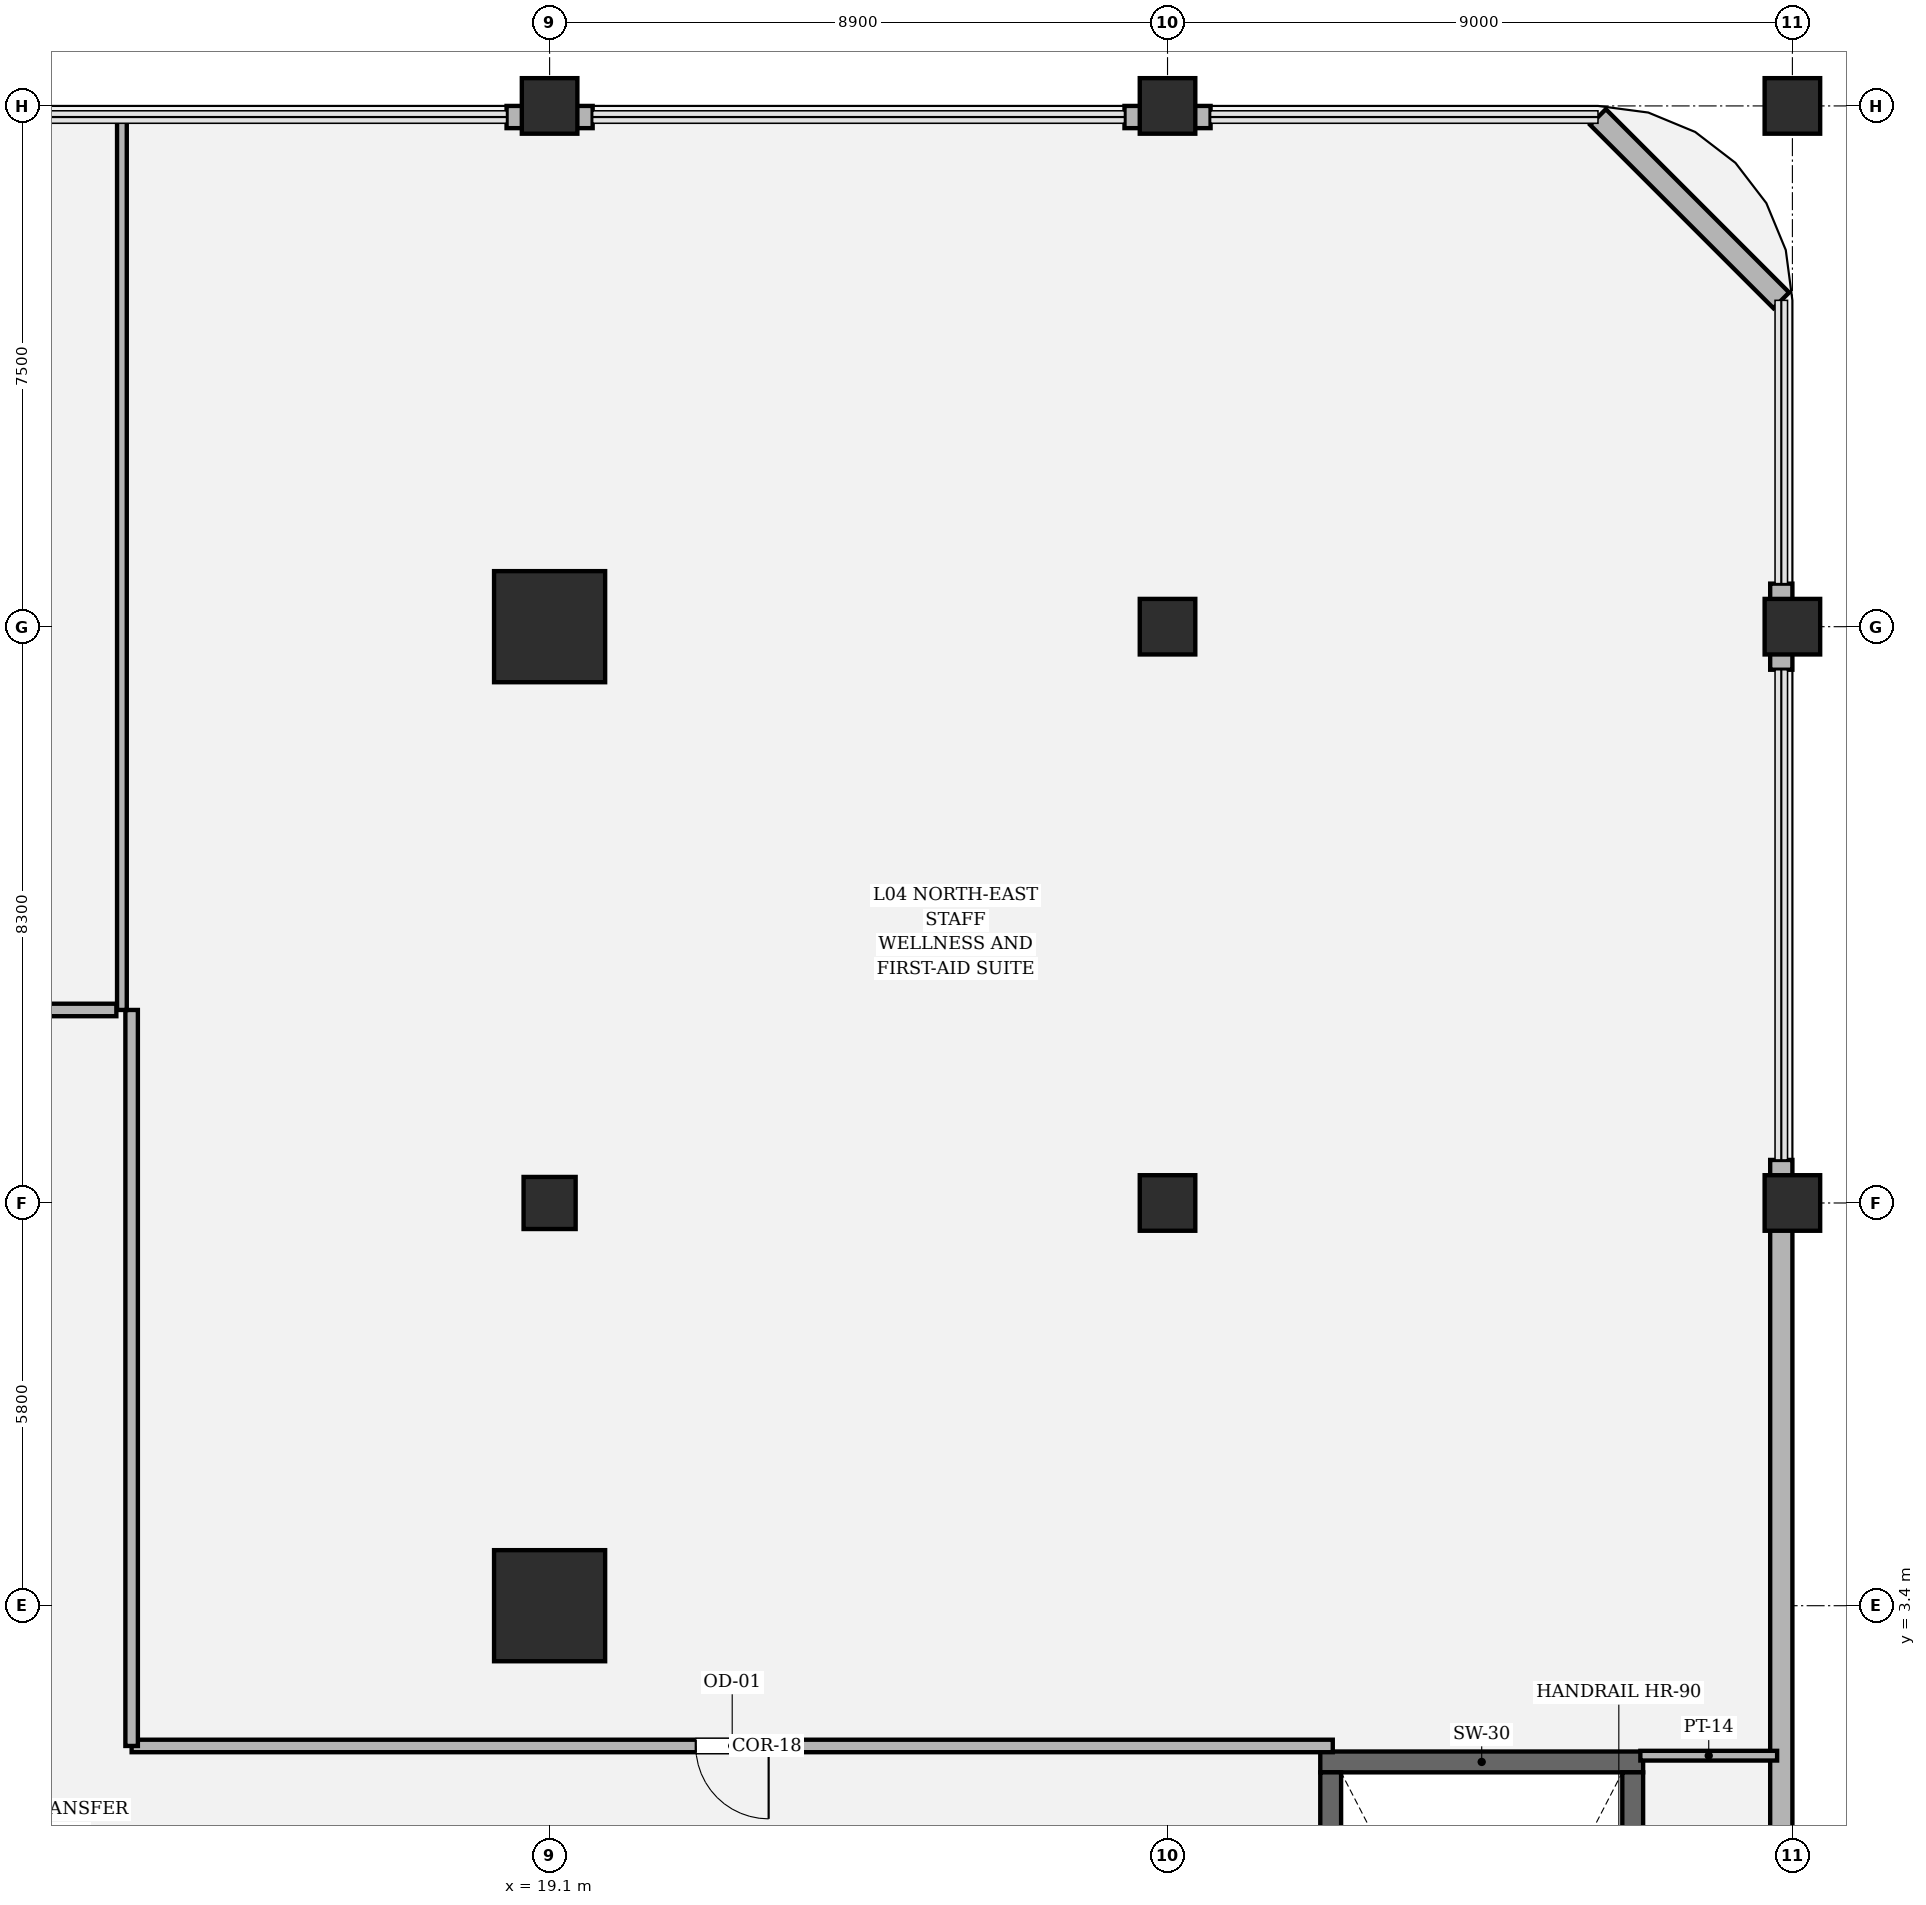
"""IFC4 building model, lengths in metres.
Left out: names, types, materials, properties, quantities, classifications, styles, units other than length and angle.
Written with IfcOpenShell. Run it as: python <this file> out.ifc"""

import sys

from ifc_helpers import new_model, si_unit, direction, frame, frame_2d, origin, origin_2d, place, context, subcontext, project, spatial, rectangle, hollow_rectangle, circle, extrude, element, fill, save


model = new_model("IFC4")
c1 = context("Model", 3, precision=1e-05, world=origin(), true_north=direction((0.0, 1.0)))
c2 = subcontext(c1, "Body", "Model", "MODEL_VIEW")
j1 = project(units=[si_unit("LENGTHUNIT", "METRE"), si_unit("PLANEANGLEUNIT", "RADIAN")], contexts=[c1])
p1 = place(None, origin())
s1 = spatial("IfcSite", under=j1, at=p1, CompositionType="ELEMENT")
p2 = place(p1, origin())
s2 = spatial("IfcBuilding", under=s1, at=p2, CompositionType="ELEMENT")
p3 = place(p2, frame((0.0, 0.0, 22.2)))
s3 = spatial("IfcBuildingStorey", under=s2, at=p3, CompositionType="ELEMENT", Elevation=22.2)
p4 = place(p3, frame((34.85, 1.15, 0.0), z_axis=(0.0, 0.0, 1.0), x_axis=(-1.0, 0.0, 0.0)))
e1 = element("IfcWall", 1, at=p4, inside=s3, PredefinedType="SOLIDWALL", context=c2, shape_type="SweptSolid", body=[
    extrude(rectangle(XDim=4.65, YDim=0.3, at=frame_2d((2.325, 0.0))), origin(), (0.0, 0.0, 1.0), 6.0),
])
for number, where, z_axis, x_axis in (
    (2, (30.35, -8.8, 0.0), (0.0, 0.0, 1.0), (0.0, 1.0, 0.0)),
    (3, (34.7, 1.0, 0.0), (0.0, 0.0, 1.0), (0.0, -1.0, 0.0)),
):
    element("IfcWall", number, at=place(p3, frame(where, z_axis=z_axis, x_axis=x_axis)), inside=s3, PredefinedType="SOLIDWALL", context=c2, shape_type="SweptSolid", body=[
        extrude(rectangle(XDim=9.8, YDim=0.3, at=frame_2d((4.9, 0.0))), origin(), (0.0, 0.0, 1.0), 6.0),
    ])
for number, where, z_axis, x_axis in (
    (4, (19.1, 3.4, 0.0), (0.0, 0.0, 1.0), (1.0, 0.0, 0.0)),
    (5, (19.1, 17.5, 0.0), (0.0, 0.0, 1.0), (1.0, 0.0, 0.0)),
):
    element("IfcColumn", number, at=place(p3, frame(where, z_axis=z_axis, x_axis=x_axis)), inside=s3, PredefinedType="COLUMN", context=c2, shape_type="SweptSolid", body=[
        extrude(hollow_rectangle(XDim=1.6, YDim=1.6, WallThickness=0.05, at=origin_2d()), origin(), (0.0, 0.0, 1.0), 6.0),
    ])
for number, where, z_axis, x_axis in (
    (6, (37.0, 9.2, 0.0), (0.0, 0.0, 1.0), (1.0, 0.0, 0.0)),
    (7, (28.0, 17.5, 0.0), (0.0, 0.0, 1.0), (1.0, 0.0, 0.0)),
    (8, (37.0, 17.5, 0.0), (0.0, 0.0, 1.0), (1.0, 0.0, 0.0)),
    (9, (19.1, 25.0, 0.0), (0.0, 0.0, 1.0), (1.0, 0.0, 0.0)),
    (10, (28.0, 25.0, 0.0), (0.0, 0.0, 1.0), (1.0, 0.0, 0.0)),
    (11, (37.0, 25.0, 0.0), (0.0, 0.0, 1.0), (1.0, 0.0, 0.0)),
    (12, (28.0, 9.2, 0.0), (0.0, 0.0, 1.0), (1.0, 0.0, 0.0)),
):
    element("IfcColumn", number, at=place(p3, frame(where, z_axis=z_axis, x_axis=x_axis)), inside=s3, PredefinedType="COLUMN", context=c2, shape_type="SweptSolid", body=[
        extrude(rectangle(XDim=0.8, YDim=0.8, at=origin_2d()), origin(), (0.0, 0.0, 1.0), 6.0),
    ])
p5 = place(p3, frame((19.1, 9.2, 0.0), z_axis=(0.0, 0.0, 1.0), x_axis=(1.0, 0.0, 0.0)))
e13 = element("IfcColumn", 13, at=p5, inside=s3, PredefinedType="PILASTER", context=c2, shape_type="SweptSolid", body=[
    extrude(circle(Radius=0.375, at=origin_2d()), origin(), (0.0, 0.0, 1.0), 6.0),
])
p6 = place(p3, frame((19.72, 24.84, 0.0), z_axis=(0.0, 0.0, 1.0), x_axis=(-1.0, 0.0, 0.0)))
e14 = element("IfcWall", 14, at=p6, inside=s3, PredefinedType="SOLIDWALL", context=c2, shape_type="SweptSolid", body=[
    extrude(rectangle(XDim=1.24, YDim=0.32, at=frame_2d((0.62, 0.0))), origin(), (0.0, 0.0, 1.0), 4.394),
])
p7 = place(p3, frame((28.62, 24.84, 0.0), z_axis=(0.0, 0.0, 1.0), x_axis=(-1.0, 0.0, 0.0)))
e15 = element("IfcWall", 15, at=p7, inside=s3, PredefinedType="SOLIDWALL", context=c2, shape_type="SweptSolid", body=[
    extrude(rectangle(XDim=1.24, YDim=0.32, at=frame_2d((0.62, 0.0))), origin(), (0.0, 0.0, 1.0), 4.394),
])
p8 = place(p3, frame((36.84, 9.82, 0.0), z_axis=(0.0, 0.0, 1.0), x_axis=(0.0, -1.0, 0.0)))
e16 = element("IfcWall", 16, at=p8, inside=s3, PredefinedType="SOLIDWALL", context=c2, shape_type="SweptSolid", body=[
    extrude(rectangle(XDim=19.64, YDim=0.32, at=frame_2d((9.82, 0.0))), origin(), (0.0, 0.0, 1.0), 5.014),
])
p9 = place(p3, frame((36.84, 18.12, 0.0), z_axis=(0.0, 0.0, 1.0), x_axis=(0.0, -1.0, 0.0)))
e17 = element("IfcWall", 17, at=p9, inside=s3, PredefinedType="SOLIDWALL", context=c2, shape_type="SweptSolid", body=[
    extrude(rectangle(XDim=1.24, YDim=0.32, at=frame_2d((0.62, 0.0))), origin(), (0.0, 0.0, 1.0), 5.014),
])
p10 = place(p3, frame((34.2, 24.84, 0.0), z_axis=(0.0, 0.0, 1.0), x_axis=(0.707106781187, -0.707106781187, 0.0)))
e18 = element("IfcWall", 18, at=p10, inside=s3, PredefinedType="SOLIDWALL", context=c2, shape_type="SweptSolid", body=[
    extrude(rectangle(XDim=3.734, YDim=0.32, at=frame_2d((1.867, 0.0))), origin(), (0.0, 0.0, 1.0), 5.014),
])
p11 = place(p3, frame((36.78, 1.24, 0.0), z_axis=(0.0, 0.0, 1.0), x_axis=(-1.0, 0.0, 0.0)))
e19 = element("IfcWall", 19, at=p11, inside=s3, PredefinedType="PARTITIONING", context=c2, shape_type="SweptSolid", body=[
    extrude(rectangle(XDim=1.97, YDim=0.14, at=frame_2d((0.985, 0.0))), origin(), (0.0, 0.0, 1.0), 5.72),
])
p12 = place(p3, frame((30.38, 1.38, 0.0), z_axis=(0.0, 0.0, 1.0), x_axis=(-1.0, 0.0, 0.0)))
e20 = element("IfcWall", 20, at=p12, inside=s3, PredefinedType="PARTITIONING", context=c2, shape_type="SweptSolid", body=[
    extrude(rectangle(XDim=17.3, YDim=0.18, at=frame_2d((8.65, 0.0))), origin(), (0.0, 0.0, 1.0), 4.394),
])
p13 = place(p12, frame((8.125, 0.0, 0.0)))
e21 = element("IfcOpeningElement", 21, at=p13, cuts=e20, PredefinedType="OPENING", context=c2, shape_type="SweptSolid", body=[
    extrude(rectangle(XDim=1.05, YDim=2.2, at=frame_2d((0.525, 1.1))), frame((0.0, 0.1, 0.0), z_axis=(0.0, -1.0, 0.0), x_axis=(1.0, 0.0, 0.0)), (0.0, 0.0, 1.0), 0.2),
])
p14 = place(p3, frame((13.08, 1.38, 0.0), z_axis=(0.0, 0.0, 1.0), x_axis=(0.0, 1.0, 0.0)))
e22 = element("IfcWall", 22, at=p14, inside=s3, PredefinedType="PARTITIONING", context=c2, shape_type="SweptSolid", body=[
    extrude(rectangle(XDim=10.6, YDim=0.18, at=frame_2d((5.3, 0.0))), origin(), (0.0, 0.0, 1.0), 4.394),
])
p15 = place(p3, frame((12.94, 11.98, 0.0), z_axis=(0.0, 0.0, 1.0), x_axis=(0.0, 1.0, 0.0)))
e23 = element("IfcWall", 23, at=p15, inside=s3, PredefinedType="PARTITIONING", context=c2, shape_type="SweptSolid", body=[
    extrude(rectangle(XDim=12.8, YDim=0.14, at=frame_2d((6.4, 0.0))), origin(), (0.0, 0.0, 1.0), 4.394),
])
p16 = place(p3, frame((12.86, 11.98, 0.0), z_axis=(0.0, 0.0, 1.0), x_axis=(-1.0, 0.0, 0.0)))
e24 = element("IfcWall", 24, at=p16, inside=s3, PredefinedType="PARTITIONING", context=c2, shape_type="SweptSolid", body=[
    extrude(rectangle(XDim=10.82, YDim=0.18, at=frame_2d((5.41, 0.0))), origin(), (0.0, 0.0, 1.0), 4.394),
])
p17 = place(p16, frame((4.885, 0.0, 0.0)))
e25 = element("IfcOpeningElement", 25, at=p17, cuts=e24, PredefinedType="OPENING", context=c2, shape_type="SweptSolid", body=[
    extrude(rectangle(XDim=1.05, YDim=2.2, at=frame_2d((0.525, 1.1))), frame((0.0, 0.1, 0.0), z_axis=(0.0, -1.0, 0.0), x_axis=(1.0, 0.0, 0.0)), (0.0, 0.0, 1.0), 0.2),
])
p18 = place(p13, origin())
e26 = element("IfcDoor", 26, at=p18, inside=s3, OperationType="SINGLE_SWING_LEFT", PredefinedType="DOOR", context=c2, shape_type="SweptSolid", body=[
    extrude(rectangle(XDim=1.05, YDim=2.2, at=frame_2d((0.525, 1.1))), frame((0.0, 0.025, 0.0), z_axis=(0.0, -1.0, 0.0), x_axis=(1.0, 0.0, 0.0)), (0.0, 0.0, 1.0), 0.05),
])
fill(e21, e26)
save(model, sys.argv[1])
